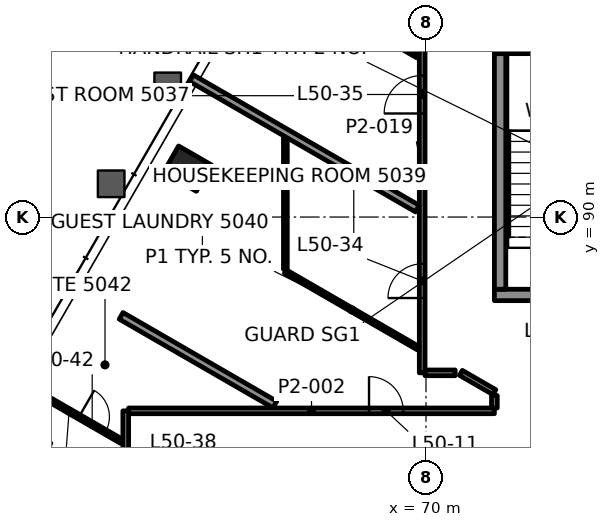
"""IFC4 building model, lengths in metres.
Left out: names, types, materials, properties, quantities, classifications, styles, units other than length and angle.
Written with IfcOpenShell. Run it as: python <this file> out.ifc"""

import sys

from ifc_helpers import new_model, si_unit, direction, frame, frame_2d, origin, origin_2d, place, context, subcontext, project, spatial, rectangle, hollow_rectangle, extrude, element, fill, save


model = new_model("IFC4")
c1 = context("Model", 3, precision=1e-05, world=origin(), true_north=direction((0.0, 1.0)))
c2 = subcontext(c1, "Body", "Model", "MODEL_VIEW")
j1 = project(units=[si_unit("LENGTHUNIT", "METRE"), si_unit("PLANEANGLEUNIT", "RADIAN")], contexts=[c1])
p1 = place(None, origin())
s1 = spatial("IfcSite", under=j1, at=p1, CompositionType="ELEMENT")
p2 = place(p1, origin())
s2 = spatial("IfcBuilding", under=s1, at=p2, CompositionType="ELEMENT")
p3 = place(p2, frame((0.0, 0.0, 214.3)))
s3 = spatial("IfcBuildingStorey", under=s2, at=p3, CompositionType="ELEMENT", Elevation=214.3)
p4 = place(p3, frame((63.724, 91.274, -0.0), z_axis=(0.0, 0.0, 1.0), x_axis=(-0.5, -0.866025403784, 0.0)))
e1 = element("IfcColumn", 1, at=p4, inside=s3, PredefinedType="COLUMN", context=c2, shape_type="SweptSolid", body=[
    extrude(hollow_rectangle(XDim=0.8, YDim=1.0, WallThickness=0.05, at=origin_2d()), origin(), (0.0, 0.0, 1.0), 3.9),
])
p5 = place(p3, frame((71.8, 87.95, 0.0), z_axis=(0.0, 0.0, 1.0), x_axis=(1.0, 0.0, 0.0)))
e2 = element("IfcWall", 2, at=p5, inside=s3, PredefinedType="SHEAR", context=c2, shape_type="SweptSolid", body=[
    extrude(rectangle(XDim=6.4, YDim=0.3, at=frame_2d((3.2, 0.0))), origin(), (0.0, 0.0, 1.0), 3.7),
])
p6 = place(p5, frame((1.325, 0.0, 0.0)))
e3 = element("IfcOpeningElement", 3, at=p6, cuts=e2, PredefinedType="OPENING", context=c2, shape_type="SweptSolid", body=[
    extrude(rectangle(XDim=1.0, YDim=2.1, at=frame_2d((0.5, 1.05))), frame((0.0, 0.16, 0.0), z_axis=(0.0, -1.0, 0.0), x_axis=(1.0, 0.0, 0.0)), (0.0, 0.0, 1.0), 0.32),
])
p7 = place(p5, frame((4.125, 0.0, 0.0)))
e4 = element("IfcOpeningElement", 4, at=p7, cuts=e2, PredefinedType="OPENING", context=c2, shape_type="SweptSolid", body=[
    extrude(rectangle(XDim=1.2, YDim=2.1, at=frame_2d((0.6, 1.05))), frame((0.0, 0.16, 0.0), z_axis=(0.0, -1.0, 0.0), x_axis=(1.0, 0.0, 0.0)), (0.0, 0.0, 1.0), 0.32),
])
p8 = place(p3, frame((71.8, 94.45, 0.0), z_axis=(0.0, 0.0, 1.0), x_axis=(1.0, 0.0, 0.0)))
e5 = element("IfcWall", 5, at=p8, inside=s3, PredefinedType="SHEAR", context=c2, shape_type="SweptSolid", body=[
    extrude(rectangle(XDim=6.4, YDim=0.3, at=frame_2d((3.2, 0.0))), origin(), (0.0, 0.0, 1.0), 3.7),
])
p9 = place(p3, frame((71.95, 88.1, 0.0), z_axis=(0.0, 0.0, 1.0), x_axis=(0.0, 1.0, 0.0)))
e6 = element("IfcWall", 6, at=p9, inside=s3, PredefinedType="SHEAR", context=c2, shape_type="SweptSolid", body=[
    extrude(rectangle(XDim=6.2, YDim=0.3, at=frame_2d((3.1, 0.0))), origin(), (0.0, 0.0, 1.0), 3.7),
])
p10 = place(p3, frame((62.175, 84.9, 0.0), z_axis=(0.0, 0.0, 1.0), x_axis=(1.0, 0.0, 0.0)))
e7 = element("IfcWall", 7, at=p10, inside=s3, PredefinedType="PARTITIONING", context=c2, shape_type="SweptSolid", body=[
    extrude(rectangle(XDim=9.625, YDim=0.15, at=frame_2d((4.812, 0.0))), origin(), (0.0, 0.0, 1.0), 3.097),
])
p11 = place(p10, frame((6.326, 0.0, 0.0)))
e8 = element("IfcOpeningElement", 8, at=p11, cuts=e7, PredefinedType="OPENING", context=c2, shape_type="SweptSolid", body=[
    extrude(rectangle(XDim=0.9, YDim=2.1, at=frame_2d((0.45, 1.05))), frame((0.0, 0.085, 0.0), z_axis=(0.0, -1.0, 0.0), x_axis=(1.0, 0.0, 0.0)), (0.0, 0.0, 1.0), 0.17),
])
p12 = place(p3, frame((69.976, 85.9, 0.0), z_axis=(0.0, 0.0, 1.0), x_axis=(1.0, 0.0, 0.0)))
e9 = element("IfcWall", 9, at=p12, inside=s3, PredefinedType="PARTITIONING", context=c2, shape_type="SweptSolid", body=[
    extrude(rectangle(XDim=0.792, YDim=0.15, at=frame_2d((0.396, 0.0))), origin(), (0.0, 0.0, 1.0), 3.097),
])
p13 = place(p3, frame((71.8, 84.975, 0.0), z_axis=(0.0, 0.0, 1.0), x_axis=(0.0, 1.0, 0.0)))
e10 = element("IfcWall", 10, at=p13, inside=s3, PredefinedType="PARTITIONING", context=c2, shape_type="SweptSolid", body=[
    extrude(rectangle(XDim=0.329, YDim=0.15, at=frame_2d((0.165, 0.0))), origin(), (0.0, 0.0, 1.0), 3.1),
])
p14 = place(p3, frame((69.9, 85.9, 0.0), z_axis=(0.0, 0.0, 1.0), x_axis=(0.0, 1.0, 0.0)))
e11 = element("IfcWall", 11, at=p14, inside=s3, PredefinedType="PARTITIONING", context=c2, shape_type="SweptSolid", body=[
    extrude(rectangle(XDim=10.6, YDim=0.15, at=frame_2d((5.3, 0.0))), origin(), (0.0, 0.0, 1.0), 3.097),
])
p15 = place(p14, frame((1.968, 0.0, 0.0)))
e12 = element("IfcOpeningElement", 12, at=p15, cuts=e11, PredefinedType="OPENING", context=c2, shape_type="SweptSolid", body=[
    extrude(rectangle(XDim=0.9, YDim=2.1, at=frame_2d((0.45, 1.05))), frame((0.0, 0.085, 0.0), z_axis=(0.0, -1.0, 0.0), x_axis=(1.0, 0.0, 0.0)), (0.0, 0.0, 1.0), 0.17),
])
p16 = place(p14, frame((6.825, 0.0, 0.0)))
e13 = element("IfcOpeningElement", 13, at=p16, cuts=e11, PredefinedType="OPENING", context=c2, shape_type="SweptSolid", body=[
    extrude(rectangle(XDim=1.0, YDim=2.1, at=frame_2d((0.5, 1.05))), frame((0.0, 0.085, 0.0), z_axis=(0.0, -1.0, 0.0), x_axis=(1.0, 0.0, 0.0)), (0.0, 0.0, 1.0), 0.17),
])
p17 = place(p3, frame((66.3, 88.624, 0.0), z_axis=(0.0, 0.0, 1.0), x_axis=(0.0, 1.0, 0.0)))
e14 = element("IfcWall", 14, at=p17, inside=s3, PredefinedType="PARTITIONING", context=c2, shape_type="SweptSolid", body=[
    extrude(rectangle(XDim=3.458, YDim=0.1, at=frame_2d((1.729, 0.0))), origin(), (0.0, 0.0, 1.0), 3.1),
])
p18 = place(p3, frame((62.1, 68.591, 0.0), z_axis=(0.0, 0.0, 1.0), x_axis=(0.0, 1.0, 0.0)))
e15 = element("IfcWall", 15, at=p18, inside=s3, PredefinedType="PARTITIONING", context=c2, shape_type="SweptSolid", body=[
    extrude(rectangle(XDim=16.309, YDim=0.15, at=frame_2d((8.154, 0.0))), origin(), (0.0, 0.0, 1.0), 3.1),
])
p19 = place(p18, frame((6.668, 0.0, 0.0)))
e16 = element("IfcOpeningElement", 16, at=p19, cuts=e15, PredefinedType="OPENING", context=c2, shape_type="SweptSolid", body=[
    extrude(rectangle(XDim=1.0, YDim=2.1, at=frame_2d((0.5, 1.05))), frame((0.0, 0.085, 0.0), z_axis=(0.0, -1.0, 0.0), x_axis=(1.0, 0.0, 0.0)), (0.0, 0.0, 1.0), 0.17),
])
p20 = place(p18, frame((13.991, 0.0, 0.0)))
e17 = element("IfcOpeningElement", 17, at=p20, cuts=e15, PredefinedType="OPENING", context=c2, shape_type="SweptSolid", body=[
    extrude(rectangle(XDim=1.0, YDim=2.1, at=frame_2d((0.5, 1.05))), frame((0.0, 0.085, 0.0), z_axis=(0.0, -1.0, 0.0), x_axis=(1.0, 0.0, 0.0)), (0.0, 0.0, 1.0), 0.17),
])
p21 = place(p3, frame((69.79, 94.24, 0.0), z_axis=(0.0, 0.0, 1.0), x_axis=(-0.86604299788, 0.499969524894, 0.0)))
e18 = element("IfcWall", 18, at=p21, inside=s3, PredefinedType="PARTITIONING", context=c2, shape_type="SweptSolid", body=[
    extrude(rectangle(XDim=3.222, YDim=0.12, at=frame_2d((1.611, 0.0))), origin(), (0.0, 0.0, 1.0), 3.1),
])
p22 = place(p3, frame((69.773, 90.222, 0.0), z_axis=(0.0, 0.0, 1.0), x_axis=(-0.866032781393, 0.499987221389, 0.0)))
e19 = element("IfcWall", 19, at=p22, inside=s3, PredefinedType="PARTITIONING", context=c2, shape_type="SweptSolid", body=[
    extrude(rectangle(XDim=6.865, YDim=0.2, at=frame_2d((3.432, 0.0))), origin(), (0.0, 0.0, 1.0), 3.022),
])
p23 = place(p3, frame((71.8, 85.391, 0.0), z_axis=(0.0, 0.0, 1.0), x_axis=(-0.866021929094, 0.500006018292, 0.0)))
e20 = element("IfcWall", 20, at=p23, inside=s3, PredefinedType="PARTITIONING", context=c2, shape_type="SweptSolid", body=[
    extrude(rectangle(XDim=1.019, YDim=0.15, at=frame_2d((0.509, 0.0))), origin(), (0.0, 0.0, 1.0), 3.1),
])
p24 = place(p3, frame((69.799, 86.546, 0.0), z_axis=(0.0, 0.0, 1.0), x_axis=(-0.866025579307, 0.499999695987, 0.0)))
e21 = element("IfcWall", 21, at=p24, inside=s3, PredefinedType="PARTITIONING", context=c2, shape_type="SweptSolid", body=[
    extrude(rectangle(XDim=4.04, YDim=0.1, at=frame_2d((2.02, 0.0))), origin(), (0.0, 0.0, 1.0), 3.1),
])
p25 = place(p3, frame((66.023, 85.065, 0.0), z_axis=(0.0, 0.0, 1.0), x_axis=(-0.866034108906, 0.499984921984, 0.0)))
e22 = element("IfcWall", 22, at=p25, inside=s3, PredefinedType="PARTITIONING", context=c2, shape_type="SweptSolid", body=[
    extrude(rectangle(XDim=4.67, YDim=0.2, at=frame_2d((2.335, 0.0))), origin(), (0.0, 0.0, 1.0), 3.1),
])
p26 = place(p3, frame((59.23, 85.691, 0.0), z_axis=(0.0, 0.0, 1.0), x_axis=(0.866042722185, -0.49997000245, 0.0)))
e23 = element("IfcWall", 23, at=p26, inside=s3, PredefinedType="PARTITIONING", context=c2, shape_type="SweptSolid", body=[
    extrude(rectangle(XDim=3.187, YDim=0.12, at=frame_2d((1.594, 0.0))), origin(), (0.0, 0.0, 1.0), 3.022),
])
p27 = place(p26, frame((1.894, 0.0, 0.0)))
e24 = element("IfcOpeningElement", 24, at=p27, cuts=e23, PredefinedType="OPENING", context=c2, shape_type="SweptSolid", body=[
    extrude(rectangle(XDim=0.8, YDim=2.1, at=frame_2d((0.4, 1.05))), frame((0.0, 0.07, 0.0), z_axis=(0.0, -1.0, 0.0), x_axis=(1.0, 0.0, 0.0)), (0.0, 0.0, 1.0), 0.14),
])
p28 = place(p11, origin())
e25 = element("IfcDoor", 25, at=p28, inside=s3, OperationType="SINGLE_SWING_LEFT", PredefinedType="DOOR", context=c2, shape_type="SweptSolid", body=[
    extrude(rectangle(XDim=0.9, YDim=2.1, at=frame_2d((0.45, 1.05))), frame((0.0, 0.025, 0.0), z_axis=(0.0, -1.0, 0.0), x_axis=(1.0, 0.0, 0.0)), (0.0, 0.0, 1.0), 0.05),
])
fill(e8, e25)
p29 = place(p15, origin())
e26 = element("IfcDoor", 26, at=p29, inside=s3, OperationType="SINGLE_SWING_RIGHT", PredefinedType="DOOR", context=c2, shape_type="SweptSolid", body=[
    extrude(rectangle(XDim=0.9, YDim=2.1, at=frame_2d((0.45, 1.05))), frame((0.0, 0.025, 0.0), z_axis=(0.0, -1.0, 0.0), x_axis=(1.0, 0.0, 0.0)), (0.0, 0.0, 1.0), 0.05),
])
fill(e12, e26)
p30 = place(p16, origin())
e27 = element("IfcDoor", 27, at=p30, inside=s3, OperationType="SINGLE_SWING_RIGHT", PredefinedType="DOOR", context=c2, shape_type="SweptSolid", body=[
    extrude(rectangle(XDim=1.0, YDim=2.1, at=frame_2d((0.5, 1.05))), frame((0.0, 0.025, 0.0), z_axis=(0.0, -1.0, 0.0), x_axis=(1.0, 0.0, 0.0)), (0.0, 0.0, 1.0), 0.05),
])
fill(e13, e27)
p31 = place(p27, origin())
e28 = element("IfcDoor", 28, at=p31, inside=s3, OperationType="SINGLE_SWING_RIGHT", PredefinedType="DOOR", context=c2, shape_type="SweptSolid", body=[
    extrude(rectangle(XDim=0.8, YDim=2.1, at=frame_2d((0.4, 1.05))), frame((0.0, 0.025, 0.0), z_axis=(0.0, -1.0, 0.0), x_axis=(1.0, 0.0, 0.0)), (0.0, 0.0, 1.0), 0.05),
])
fill(e24, e28)
save(model, sys.argv[1])
